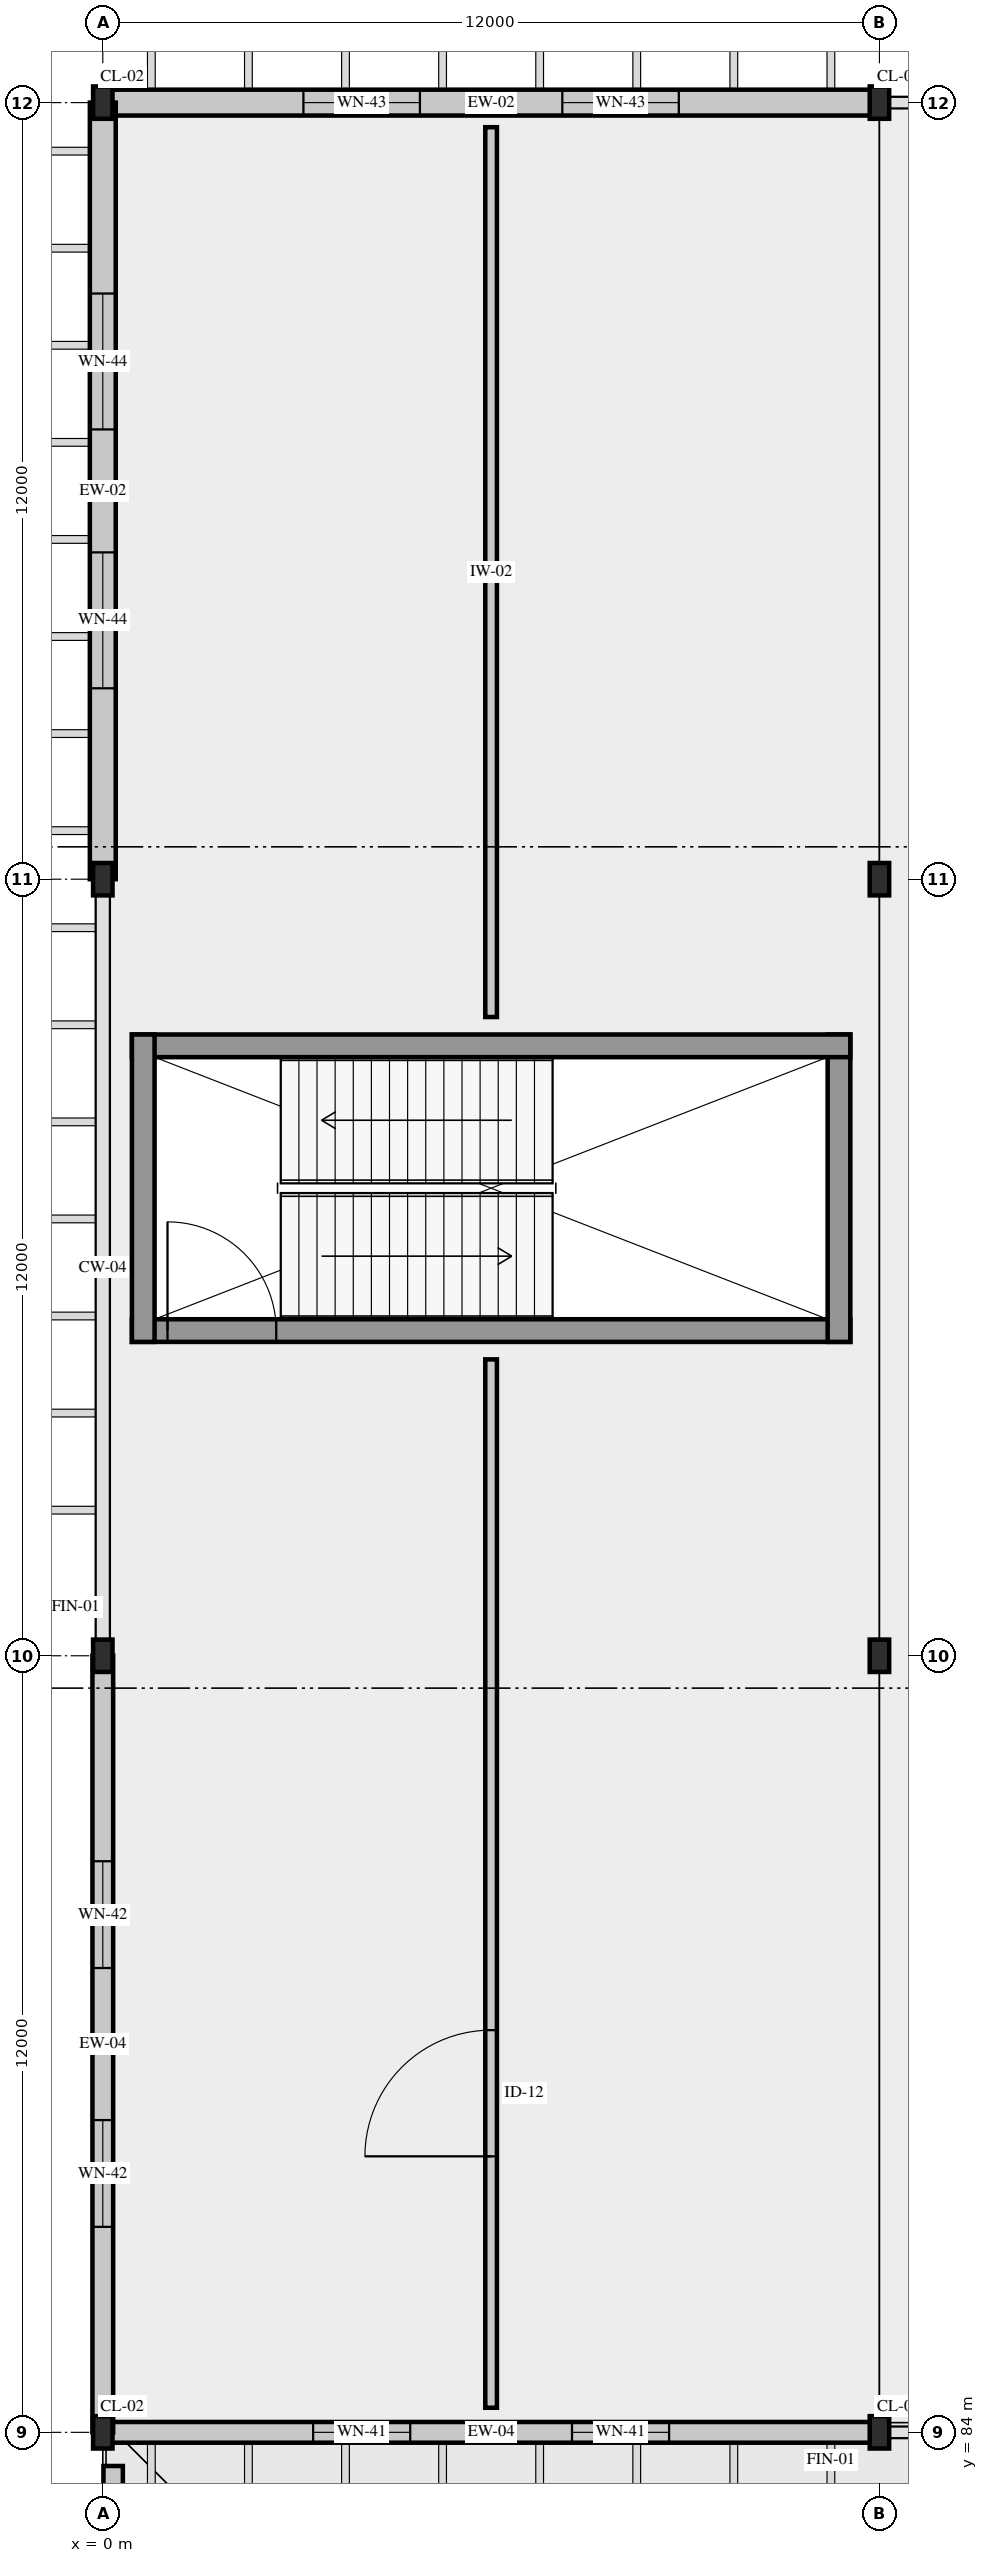
"""IFC4 building model, lengths in metres.
Left out: names, types, materials, properties, quantities, classifications, styles, units other than length and angle.
Written with IfcOpenShell. Run it as: python <this file> out.ifc"""

import sys

from ifc_helpers import new_model, si_unit, direction, frame, frame_2d, origin, origin_2d, place, context, subcontext, project, spatial, rectangle, i_section, extrude, element, fill, save


model = new_model("IFC4")
c1 = context("Model", 3, precision=1e-05, world=origin(), true_north=direction((0.0, 1.0)))
c2 = subcontext(c1, "Body", "Model", "MODEL_VIEW")
j1 = project(units=[si_unit("LENGTHUNIT", "METRE"), si_unit("PLANEANGLEUNIT", "RADIAN")], contexts=[c1])
p1 = place(None, origin())
s1 = spatial("IfcSite", under=j1, at=p1, CompositionType="ELEMENT")
p2 = place(p1, origin())
s2 = spatial("IfcBuilding", under=s1, at=p2, CompositionType="ELEMENT")
p3 = place(p2, frame((0.0, 0.0, 10.8)))
s3 = spatial("IfcBuildingStorey", under=s2, at=p3, CompositionType="ELEMENT", Elevation=10.8)
for number, where, z_axis, x_axis in (
    (1, (0.0, 84.0, 0.0), (0.0, 0.0, 1.0), (1.0, 0.0, 0.0)),
    (2, (0.0, 96.0, 0.0), (0.0, 0.0, 1.0), (1.0, 0.0, 0.0)),
    (3, (0.0, 108.0, 0.0), (0.0, 0.0, 1.0), (1.0, 0.0, 0.0)),
    (4, (0.0, 120.0, 0.0), (0.0, 0.0, 1.0), (1.0, 0.0, 0.0)),
    (5, (12.0, 84.0, 0.0), (0.0, 0.0, 1.0), (1.0, 0.0, 0.0)),
    (6, (12.0, 96.0, 0.0), (0.0, 0.0, 1.0), (1.0, 0.0, 0.0)),
    (7, (12.0, 108.0, 0.0), (0.0, 0.0, 1.0), (1.0, 0.0, 0.0)),
    (8, (12.0, 120.0, 0.0), (0.0, 0.0, 1.0), (1.0, 0.0, 0.0)),
):
    element("IfcColumn", number, at=place(p3, frame(where, z_axis=z_axis, x_axis=x_axis)), inside=s3, PredefinedType="COLUMN", context=c2, shape_type="SweptSolid", body=[
        extrude(i_section(OverallWidth=0.3, OverallDepth=0.5, WebThickness=0.014, FlangeThickness=0.028, FilletRadius=0.027, at=origin_2d()), origin(), (0.0, 0.0, 1.0), 6.0),
    ])
p4 = place(p3, frame((0.0, 84.0, 0.0), z_axis=(0.0, 0.0, 1.0), x_axis=(1.0, 0.0, 0.0)))
e9 = element("IfcWall", 9, at=p4, inside=s3, PredefinedType="SOLIDWALL", context=c2, shape_type="SweptSolid", body=[
    extrude(rectangle(XDim=12.0, YDim=0.32, at=frame_2d((6.0, 0.0))), origin(), (0.0, 0.0, 1.0), 5.11),
])
p5 = place(p4, frame((3.25, 0.0, 0.95)))
e10 = element("IfcOpeningElement", 10, at=p5, cuts=e9, PredefinedType="OPENING", context=c2, shape_type="SweptSolid", body=[
    extrude(rectangle(XDim=1.5, YDim=2.4, at=frame_2d((0.75, 1.2))), frame((0.0, 0.17, 0.0), z_axis=(0.0, -1.0, 0.0), x_axis=(1.0, 0.0, 0.0)), (0.0, 0.0, 1.0), 0.34),
])
p6 = place(p4, frame((7.25, 0.0, 0.95)))
e11 = element("IfcOpeningElement", 11, at=p6, cuts=e9, PredefinedType="OPENING", context=c2, shape_type="SweptSolid", body=[
    extrude(rectangle(XDim=1.5, YDim=2.4, at=frame_2d((0.75, 1.2))), frame((0.0, 0.17, 0.0), z_axis=(0.0, -1.0, 0.0), x_axis=(1.0, 0.0, 0.0)), (0.0, 0.0, 1.0), 0.34),
])
p7 = place(p3, frame((0.0, 96.0, 0.0), z_axis=(0.0, 0.0, 1.0), x_axis=(0.0, -1.0, 0.0)))
e12 = element("IfcWall", 12, at=p7, inside=s3, PredefinedType="SOLIDWALL", context=c2, shape_type="SweptSolid", body=[
    extrude(rectangle(XDim=12.0, YDim=0.32, at=frame_2d((6.0, 0.0))), origin(), (0.0, 0.0, 1.0), 5.11),
])
p8 = place(p7, frame((3.175, 0.0, 0.95)))
e13 = element("IfcOpeningElement", 13, at=p8, cuts=e12, PredefinedType="OPENING", context=c2, shape_type="SweptSolid", body=[
    extrude(rectangle(XDim=1.65, YDim=2.4, at=frame_2d((0.825, 1.2))), frame((0.0, 0.17, 0.0), z_axis=(0.0, -1.0, 0.0), x_axis=(1.0, 0.0, 0.0)), (0.0, 0.0, 1.0), 0.34),
])
p9 = place(p7, frame((7.175, 0.0, 0.95)))
e14 = element("IfcOpeningElement", 14, at=p9, cuts=e12, PredefinedType="OPENING", context=c2, shape_type="SweptSolid", body=[
    extrude(rectangle(XDim=1.65, YDim=2.4, at=frame_2d((0.825, 1.2))), frame((0.0, 0.17, 0.0), z_axis=(0.0, -1.0, 0.0), x_axis=(1.0, 0.0, 0.0)), (0.0, 0.0, 1.0), 0.34),
])
p10 = place(p3, frame((12.0, 120.0, 0.0), z_axis=(0.0, 0.0, 1.0), x_axis=(-1.0, 0.0, 0.0)))
e15 = element("IfcWall", 15, at=p10, inside=s3, PredefinedType="SOLIDWALL", context=c2, shape_type="SweptSolid", body=[
    extrude(rectangle(XDim=12.0, YDim=0.4, at=frame_2d((6.0, 0.0))), origin(), (0.0, 0.0, 1.0), 5.11),
])
p11 = place(p10, frame((3.1, 0.0, 0.95)))
e16 = element("IfcOpeningElement", 16, at=p11, cuts=e15, PredefinedType="OPENING", context=c2, shape_type="SweptSolid", body=[
    extrude(rectangle(XDim=1.8, YDim=2.4, at=frame_2d((0.9, 1.2))), frame((0.0, 0.21, 0.0), z_axis=(0.0, -1.0, 0.0), x_axis=(1.0, 0.0, 0.0)), (0.0, 0.0, 1.0), 0.42),
])
p12 = place(p10, frame((7.1, 0.0, 0.95)))
e17 = element("IfcOpeningElement", 17, at=p12, cuts=e15, PredefinedType="OPENING", context=c2, shape_type="SweptSolid", body=[
    extrude(rectangle(XDim=1.8, YDim=2.4, at=frame_2d((0.9, 1.2))), frame((0.0, 0.21, 0.0), z_axis=(0.0, -1.0, 0.0), x_axis=(1.0, 0.0, 0.0)), (0.0, 0.0, 1.0), 0.42),
])
p13 = place(p3, frame((0.0, 120.0, 0.0), z_axis=(0.0, 0.0, 1.0), x_axis=(0.0, -1.0, 0.0)))
e18 = element("IfcWall", 18, at=p13, inside=s3, PredefinedType="SOLIDWALL", context=c2, shape_type="SweptSolid", body=[
    extrude(rectangle(XDim=12.0, YDim=0.4, at=frame_2d((6.0, 0.0))), origin(), (0.0, 0.0, 1.0), 5.11),
])
p14 = place(p13, frame((2.95, 0.0, 0.95)))
e19 = element("IfcOpeningElement", 19, at=p14, cuts=e18, PredefinedType="OPENING", context=c2, shape_type="SweptSolid", body=[
    extrude(rectangle(XDim=2.1, YDim=2.4, at=frame_2d((1.05, 1.2))), frame((0.0, 0.21, 0.0), z_axis=(0.0, -1.0, 0.0), x_axis=(1.0, 0.0, 0.0)), (0.0, 0.0, 1.0), 0.42),
])
p15 = place(p13, frame((6.95, 0.0, 0.95)))
e20 = element("IfcOpeningElement", 20, at=p15, cuts=e18, PredefinedType="OPENING", context=c2, shape_type="SweptSolid", body=[
    extrude(rectangle(XDim=2.1, YDim=2.4, at=frame_2d((1.05, 1.2))), frame((0.0, 0.21, 0.0), z_axis=(0.0, -1.0, 0.0), x_axis=(1.0, 0.0, 0.0)), (0.0, 0.0, 1.0), 0.42),
])
p16 = place(p3, frame((0.16, 62.72, 0.0), z_axis=(0.0, 0.0, 1.0), x_axis=(0.0, 1.0, 0.0)))
e21 = element("IfcWall", 21, at=p16, inside=s3, PredefinedType="PARAPET", context=c2, shape_type="SweptSolid", body=[
    extrude(rectangle(XDim=20.76, YDim=0.3, at=frame_2d((10.38, 0.0))), origin(), (0.0, 0.0, 1.0), 1.15),
])
p17 = place(p3, frame((0.45, 101.025, 0.0), z_axis=(0.0, 0.0, 1.0), x_axis=(1.0, 0.0, 0.0)))
e22 = element("IfcWall", 22, at=p17, inside=s3, PredefinedType="SHEAR", context=c2, shape_type="SweptSolid", body=[
    extrude(rectangle(XDim=11.1, YDim=0.35, at=frame_2d((5.55, 0.0))), origin(), (0.0, 0.0, 1.0), 5.69),
])
p18 = place(p17, frame((0.55, 0.0, 0.0)))
e23 = element("IfcOpeningElement", 23, at=p18, cuts=e22, PredefinedType="OPENING", context=c2, shape_type="SweptSolid", body=[
    extrude(rectangle(XDim=1.68, YDim=2.35, at=frame_2d((0.84, 1.175))), frame((0.0, 0.185, 0.0), z_axis=(0.0, -1.0, 0.0), x_axis=(1.0, 0.0, 0.0)), (0.0, 0.0, 1.0), 0.37),
])
p19 = place(p3, frame((11.375, 100.85, 0.0), z_axis=(0.0, 0.0, 1.0), x_axis=(0.0, 1.0, 0.0)))
e24 = element("IfcWall", 24, at=p19, inside=s3, PredefinedType="SHEAR", context=c2, shape_type="SweptSolid", body=[
    extrude(rectangle(XDim=4.75, YDim=0.35, at=frame_2d((2.375, 0.0))), origin(), (0.0, 0.0, 1.0), 5.69),
])
p20 = place(p3, frame((11.55, 105.425, 0.0), z_axis=(0.0, 0.0, 1.0), x_axis=(-1.0, 0.0, 0.0)))
e25 = element("IfcWall", 25, at=p20, inside=s3, PredefinedType="SHEAR", context=c2, shape_type="SweptSolid", body=[
    extrude(rectangle(XDim=11.1, YDim=0.35, at=frame_2d((5.55, 0.0))), origin(), (0.0, 0.0, 1.0), 5.69),
])
p21 = place(p3, frame((0.625, 105.6, 0.0), z_axis=(0.0, 0.0, 1.0), x_axis=(0.0, -1.0, 0.0)))
e26 = element("IfcWall", 26, at=p21, inside=s3, PredefinedType="SHEAR", context=c2, shape_type="SweptSolid", body=[
    extrude(rectangle(XDim=4.75, YDim=0.35, at=frame_2d((2.375, 0.0))), origin(), (0.0, 0.0, 1.0), 5.69),
])
p22 = place(p3, frame((6.0, 84.38, 0.0), z_axis=(0.0, 0.0, 1.0), x_axis=(0.0, 1.0, 0.0)))
e27 = element("IfcWall", 27, at=p22, inside=s3, PredefinedType="PARTITIONING", context=c2, shape_type="SweptSolid", body=[
    extrude(rectangle(XDim=16.2, YDim=0.18, at=frame_2d((8.1, 0.0))), origin(), (0.0, 0.0, 1.0), 5.39),
])
p23 = place(p22, frame((3.885, 0.0, 0.0)))
e28 = element("IfcOpeningElement", 28, at=p23, cuts=e27, PredefinedType="OPENING", context=c2, shape_type="SweptSolid", body=[
    extrude(rectangle(XDim=1.95, YDim=2.45, at=frame_2d((0.975, 1.225))), frame((0.0, 0.1, 0.0), z_axis=(0.0, -1.0, 0.0), x_axis=(1.0, 0.0, 0.0)), (0.0, 0.0, 1.0), 0.2),
])
p24 = place(p3, frame((6.0, 105.87, 0.0), z_axis=(0.0, 0.0, 1.0), x_axis=(0.0, 1.0, 0.0)))
e29 = element("IfcWall", 29, at=p24, inside=s3, PredefinedType="PARTITIONING", context=c2, shape_type="SweptSolid", body=[
    extrude(rectangle(XDim=13.75, YDim=0.18, at=frame_2d((6.875, 0.0))), origin(), (0.0, 0.0, 1.0), 5.18),
])
p25 = place(p5, origin())
e30 = element("IfcWindow", 30, at=p25, inside=s3, PartitioningType="SINGLE_PANEL", PredefinedType="WINDOW", context=c2, shape_type="SweptSolid", body=[
    extrude(rectangle(XDim=1.5, YDim=2.4, at=frame_2d((0.75, 1.2))), frame((0.0, 0.03, 0.0), z_axis=(0.0, -1.0, 0.0), x_axis=(1.0, 0.0, 0.0)), (0.0, 0.0, 1.0), 0.06),
])
fill(e10, e30)
p26 = place(p6, origin())
e31 = element("IfcWindow", 31, at=p26, inside=s3, PartitioningType="SINGLE_PANEL", PredefinedType="WINDOW", context=c2, shape_type="SweptSolid", body=[
    extrude(rectangle(XDim=1.5, YDim=2.4, at=frame_2d((0.75, 1.2))), frame((0.0, 0.03, 0.0), z_axis=(0.0, -1.0, 0.0), x_axis=(1.0, 0.0, 0.0)), (0.0, 0.0, 1.0), 0.06),
])
fill(e11, e31)
p27 = place(p8, origin())
e32 = element("IfcWindow", 32, at=p27, inside=s3, PartitioningType="SINGLE_PANEL", PredefinedType="WINDOW", context=c2, shape_type="SweptSolid", body=[
    extrude(rectangle(XDim=1.65, YDim=2.4, at=frame_2d((0.825, 1.2))), frame((0.0, 0.03, 0.0), z_axis=(0.0, -1.0, 0.0), x_axis=(1.0, 0.0, 0.0)), (0.0, 0.0, 1.0), 0.06),
])
fill(e13, e32)
p28 = place(p9, origin())
e33 = element("IfcWindow", 33, at=p28, inside=s3, PartitioningType="SINGLE_PANEL", PredefinedType="WINDOW", context=c2, shape_type="SweptSolid", body=[
    extrude(rectangle(XDim=1.65, YDim=2.4, at=frame_2d((0.825, 1.2))), frame((0.0, 0.03, 0.0), z_axis=(0.0, -1.0, 0.0), x_axis=(1.0, 0.0, 0.0)), (0.0, 0.0, 1.0), 0.06),
])
fill(e14, e33)
p29 = place(p11, origin())
e34 = element("IfcWindow", 34, at=p29, inside=s3, PartitioningType="SINGLE_PANEL", PredefinedType="WINDOW", context=c2, shape_type="SweptSolid", body=[
    extrude(rectangle(XDim=1.8, YDim=2.4, at=frame_2d((0.9, 1.2))), frame((0.0, 0.03, 0.0), z_axis=(0.0, -1.0, 0.0), x_axis=(1.0, 0.0, 0.0)), (0.0, 0.0, 1.0), 0.06),
])
fill(e16, e34)
p30 = place(p12, origin())
e35 = element("IfcWindow", 35, at=p30, inside=s3, PartitioningType="SINGLE_PANEL", PredefinedType="WINDOW", context=c2, shape_type="SweptSolid", body=[
    extrude(rectangle(XDim=1.8, YDim=2.4, at=frame_2d((0.9, 1.2))), frame((0.0, 0.03, 0.0), z_axis=(0.0, -1.0, 0.0), x_axis=(1.0, 0.0, 0.0)), (0.0, 0.0, 1.0), 0.06),
])
fill(e17, e35)
p31 = place(p14, origin())
e36 = element("IfcWindow", 36, at=p31, inside=s3, PartitioningType="SINGLE_PANEL", PredefinedType="WINDOW", context=c2, shape_type="SweptSolid", body=[
    extrude(rectangle(XDim=2.1, YDim=2.4, at=frame_2d((1.05, 1.2))), frame((0.0, 0.03, 0.0), z_axis=(0.0, -1.0, 0.0), x_axis=(1.0, 0.0, 0.0)), (0.0, 0.0, 1.0), 0.06),
])
fill(e19, e36)
p32 = place(p15, origin())
e37 = element("IfcWindow", 37, at=p32, inside=s3, PartitioningType="SINGLE_PANEL", PredefinedType="WINDOW", context=c2, shape_type="SweptSolid", body=[
    extrude(rectangle(XDim=2.1, YDim=2.4, at=frame_2d((1.05, 1.2))), frame((0.0, 0.03, 0.0), z_axis=(0.0, -1.0, 0.0), x_axis=(1.0, 0.0, 0.0)), (0.0, 0.0, 1.0), 0.06),
])
fill(e20, e37)
p33 = place(p18, origin())
e38 = element("IfcDoor", 38, at=p33, inside=s3, OperationType="DOUBLE_DOOR_SINGLE_SWING", PredefinedType="DOOR", context=c2, shape_type="SweptSolid", body=[
    extrude(rectangle(XDim=1.68, YDim=2.35, at=frame_2d((0.84, 1.175))), frame((0.0, 0.025, 0.0), z_axis=(0.0, -1.0, 0.0), x_axis=(1.0, 0.0, 0.0)), (0.0, 0.0, 1.0), 0.05),
])
fill(e23, e38)
p34 = place(p23, origin())
e39 = element("IfcDoor", 39, at=p34, inside=s3, OperationType="DOUBLE_DOOR_SINGLE_SWING", PredefinedType="DOOR", context=c2, shape_type="SweptSolid", body=[
    extrude(rectangle(XDim=1.95, YDim=2.45, at=frame_2d((0.975, 1.225))), frame((0.0, 0.025, 0.0), z_axis=(0.0, -1.0, 0.0), x_axis=(1.0, 0.0, 0.0)), (0.0, 0.0, 1.0), 0.05),
])
fill(e28, e39)
save(model, sys.argv[1])
